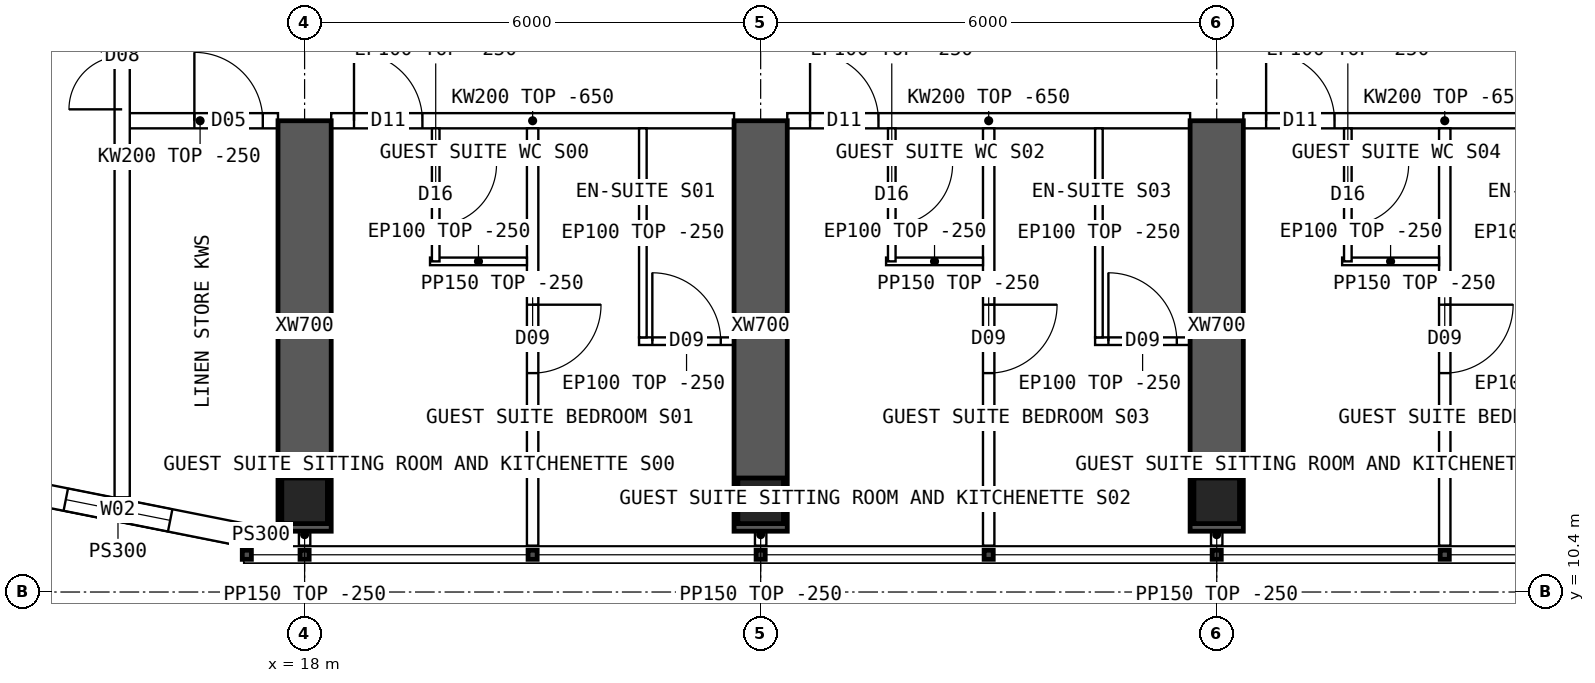
"""IFC4 building model, lengths in metres.
Left out: names, types, materials, properties, quantities, classifications, styles, units other than length and angle.
Written with IfcOpenShell. Run it as: python <this file> out.ifc"""

import sys

from ifc_helpers import new_model, si_unit, direction, frame, frame_2d, origin, origin_2d, place, context, subcontext, project, spatial, polyline, rectangle, hollow_rectangle, outline, extrude, element, fill, save


model = new_model("IFC4")
c1 = context("Model", 3, precision=1e-05, world=origin(), true_north=direction((0.0, 1.0)))
c2 = subcontext(c1, "Body", "Model", "MODEL_VIEW")
j1 = project(units=[si_unit("LENGTHUNIT", "METRE"), si_unit("PLANEANGLEUNIT", "RADIAN")], contexts=[c1])
p1 = place(None, origin())
s1 = spatial("IfcSite", under=j1, at=p1, CompositionType="ELEMENT")
p2 = place(p1, origin())
s2 = spatial("IfcBuilding", under=s1, at=p2, CompositionType="ELEMENT")
p3 = place(p2, frame((0.0, 0.0, 235.3)))
s3 = spatial("IfcBuildingStorey", under=s2, at=p3, CompositionType="ELEMENT", Elevation=235.3)
for number, where, z_axis, x_axis in (
    (1, (18.0, 11.6, 0.0), (0.0, 0.0, 1.0), (1.0, 0.0, 0.0)),
    (2, (24.0, 11.6, 0.0), (0.0, 0.0, 1.0), (1.0, 0.0, 0.0)),
    (3, (30.0, 11.6, 0.0), (0.0, 0.0, 1.0), (1.0, 0.0, 0.0)),
):
    element("IfcColumn", number, at=place(p3, frame(where, z_axis=z_axis, x_axis=x_axis)), inside=s3, PredefinedType="COLUMN", context=c2, shape_type="SweptSolid", body=[
        extrude(hollow_rectangle(XDim=0.6, YDim=0.6, WallThickness=0.06, at=origin_2d()), origin(), (0.0, 0.0, 1.0), 3.75),
    ])
for number, where, z_axis, x_axis in (
    (4, (18.0, 11.2, 0.0), (0.0, 0.0, 1.0), (0.0, 1.0, 0.0)),
    (5, (24.0, 11.2, 0.0), (0.0, 0.0, 1.0), (0.0, 1.0, 0.0)),
    (6, (30.0, 11.2, 0.0), (0.0, 0.0, 1.0), (0.0, 1.0, 0.0)),
):
    element("IfcWall", number, at=place(p3, frame(where, z_axis=z_axis, x_axis=x_axis)), inside=s3, PredefinedType="SHEAR", context=c2, shape_type="SweptSolid", body=[
        extrude(rectangle(XDim=5.4, YDim=0.7, at=frame_2d((2.7, 0.0))), origin(), (0.0, 0.0, 1.0), 3.75),
    ])
p4 = place(p3, frame((13.89, 11.808, 0.0), z_axis=(0.0, 0.0, 1.0), x_axis=(0.98078325777, -0.195100490205, 0.0)))
e7 = element("IfcWall", 7, at=p4, inside=s3, PredefinedType="SOLIDWALL", context=c2, shape_type="SweptSolid", body=[
    extrude(outline(polyline([(-0.03, -0.15), (3.405, -0.15), (3.345, 0.15), (0.03, 0.15), (-0.03, -0.15)])), origin(), (0.0, 0.0, 1.0), 3.5),
])
p5 = place(p4, frame((0.988, 0.0, 0.9)))
e8 = element("IfcOpeningElement", 8, at=p5, cuts=e7, PredefinedType="OPENING", context=c2, shape_type="SweptSolid", body=[
    extrude(rectangle(XDim=1.4, YDim=1.8, at=frame_2d((0.7, 0.9))), frame((0.0, 0.16, 0.0), z_axis=(0.0, -1.0, 0.0), x_axis=(1.0, 0.0, 0.0)), (0.0, 0.0, 1.0), 0.32),
])
p6 = place(p3, frame((17.2, 11.15, 0.0), z_axis=(0.0, 0.0, 1.0), x_axis=(1.0, 0.0, 0.0)))
e9 = element("IfcWall", 9, at=p6, inside=s3, PredefinedType="SOLIDWALL", context=c2, shape_type="SweptSolid", body=[
    extrude(rectangle(XDim=0.45, YDim=0.3, at=frame_2d((0.225, 0.0))), origin(), (0.0, 0.0, 1.0), 3.5),
])
p7 = place(p3, frame((15.6, 16.6, 0.0), z_axis=(0.0, 0.0, 1.0), x_axis=(1.0, 0.0, 0.0)))
e10 = element("IfcWall", 10, at=p7, inside=s3, PredefinedType="SOLIDWALL", context=c2, shape_type="SweptSolid", body=[
    extrude(rectangle(XDim=2.05, YDim=0.2, at=frame_2d((1.025, 0.0))), origin(), (0.0, 0.0, 1.0), 3.5),
])
p8 = place(p7, frame((0.95, 0.0, 0.0)))
e11 = element("IfcOpeningElement", 11, at=p8, cuts=e10, PredefinedType="OPENING", context=c2, shape_type="SweptSolid", body=[
    extrude(rectangle(XDim=0.9, YDim=2.1, at=frame_2d((0.45, 1.05))), frame((0.0, 0.11, 0.0), z_axis=(0.0, -1.0, 0.0), x_axis=(1.0, 0.0, 0.0)), (0.0, 0.0, 1.0), 0.22),
])
p9 = place(p3, frame((18.35, 16.6, 0.0), z_axis=(0.0, 0.0, 1.0), x_axis=(1.0, 0.0, 0.0)))
e12 = element("IfcWall", 12, at=p9, inside=s3, PredefinedType="SOLIDWALL", context=c2, shape_type="SweptSolid", body=[
    extrude(outline(polyline([(0.0, 0.0), (5.3, 0.0), (5.3, 3.1), (0.0, 3.1), (0.0, 0.0)])), frame((0.0, 0.1, 0.0), z_axis=(0.0, -1.0, 0.0), x_axis=(1.0, 0.0, 0.0)), (0.0, 0.0, 1.0), 0.2),
])
p10 = place(p9, frame((0.3, 0.0, 0.0)))
e13 = element("IfcOpeningElement", 13, at=p10, cuts=e12, PredefinedType="OPENING", context=c2, shape_type="SweptSolid", body=[
    extrude(rectangle(XDim=0.9, YDim=2.1, at=frame_2d((0.45, 1.05))), frame((0.0, 0.11, 0.0), z_axis=(0.0, -1.0, 0.0), x_axis=(1.0, 0.0, 0.0)), (0.0, 0.0, 1.0), 0.22),
])
p11 = place(p3, frame((24.35, 16.6, 0.0), z_axis=(0.0, 0.0, 1.0), x_axis=(1.0, 0.0, 0.0)))
e14 = element("IfcWall", 14, at=p11, inside=s3, PredefinedType="SOLIDWALL", context=c2, shape_type="SweptSolid", body=[
    extrude(outline(polyline([(0.0, 0.0), (5.3, 0.0), (5.3, 3.1), (0.0, 3.1), (0.0, 0.0)])), frame((0.0, 0.1, 0.0), z_axis=(0.0, -1.0, 0.0), x_axis=(1.0, 0.0, 0.0)), (0.0, 0.0, 1.0), 0.2),
])
p12 = place(p11, frame((0.3, 0.0, 0.0)))
e15 = element("IfcOpeningElement", 15, at=p12, cuts=e14, PredefinedType="OPENING", context=c2, shape_type="SweptSolid", body=[
    extrude(rectangle(XDim=0.9, YDim=2.1, at=frame_2d((0.45, 1.05))), frame((0.0, 0.11, 0.0), z_axis=(0.0, -1.0, 0.0), x_axis=(1.0, 0.0, 0.0)), (0.0, 0.0, 1.0), 0.22),
])
p13 = place(p3, frame((30.35, 16.6, 0.0), z_axis=(0.0, 0.0, 1.0), x_axis=(1.0, 0.0, 0.0)))
e16 = element("IfcWall", 16, at=p13, inside=s3, PredefinedType="SOLIDWALL", context=c2, shape_type="SweptSolid", body=[
    extrude(outline(polyline([(0.0, 0.0), (5.3, 0.0), (5.3, 3.1), (0.0, 3.1), (0.0, 0.0)])), frame((0.0, 0.1, 0.0), z_axis=(0.0, -1.0, 0.0), x_axis=(1.0, 0.0, 0.0)), (0.0, 0.0, 1.0), 0.2),
])
p14 = place(p13, frame((0.3, 0.0, 0.0)))
e17 = element("IfcOpeningElement", 17, at=p14, cuts=e16, PredefinedType="OPENING", context=c2, shape_type="SweptSolid", body=[
    extrude(rectangle(XDim=0.9, YDim=2.1, at=frame_2d((0.45, 1.05))), frame((0.0, 0.11, 0.0), z_axis=(0.0, -1.0, 0.0), x_axis=(1.0, 0.0, 0.0)), (0.0, 0.0, 1.0), 0.22),
])
p15 = place(p3, frame((21.0, 11.01, 0.0), z_axis=(0.0, 0.0, 1.0), x_axis=(0.0, 1.0, 0.0)))
e18 = element("IfcWall", 18, at=p15, inside=s3, PredefinedType="PARTITIONING", context=c2, shape_type="SweptSolid", body=[
    extrude(outline(polyline([(0.0, 0.0), (5.49, 0.0), (5.49, 3.1), (5.442, 3.1), (5.44, 3.5), (0.792, 3.5), (0.79, 3.1), (0.392, 3.1), (0.39, 3.5), (0.0, 3.5), (0.0, 0.0)])), frame((0.0, 0.075, 0.0), z_axis=(0.0, -1.0, 0.0), x_axis=(1.0, 0.0, 0.0)), (0.0, 0.0, 1.0), 0.15),
])
p16 = place(p15, frame((2.27, 0.0, 0.0)))
e19 = element("IfcOpeningElement", 19, at=p16, cuts=e18, PredefinedType="OPENING", context=c2, shape_type="SweptSolid", body=[
    extrude(rectangle(XDim=0.9, YDim=2.1, at=frame_2d((0.45, 1.05))), frame((0.0, 0.085, 0.0), z_axis=(0.0, -1.0, 0.0), x_axis=(1.0, 0.0, 0.0)), (0.0, 0.0, 1.0), 0.17),
])
p17 = place(p3, frame((23.65, 13.7, 0.0), z_axis=(0.0, 0.0, 1.0), x_axis=(-1.0, 0.0, 0.0)))
e20 = element("IfcWall", 20, at=p17, inside=s3, PredefinedType="PARTITIONING", context=c2, shape_type="SweptSolid", body=[
    extrude(rectangle(XDim=1.25, YDim=0.1, at=frame_2d((0.625, 0.0))), origin(), (0.0, 0.0, 1.0), 3.5),
])
p18 = place(p17, frame((0.175, 0.0, 0.0)))
e21 = element("IfcOpeningElement", 21, at=p18, cuts=e20, PredefinedType="OPENING", context=c2, shape_type="SweptSolid", body=[
    extrude(rectangle(XDim=0.9, YDim=2.1, at=frame_2d((0.45, 1.05))), frame((0.0, 0.06, 0.0), z_axis=(0.0, -1.0, 0.0), x_axis=(1.0, 0.0, 0.0)), (0.0, 0.0, 1.0), 0.12),
])
p19 = place(p3, frame((22.45, 13.75, 0.0), z_axis=(0.0, 0.0, 1.0), x_axis=(0.0, 1.0, 0.0)))
e22 = element("IfcWall", 22, at=p19, inside=s3, PredefinedType="PARTITIONING", context=c2, shape_type="SweptSolid", body=[
    extrude(outline(polyline([(0.0, 0.0), (2.75, 0.0), (2.75, 3.1), (2.702, 3.1), (2.7, 3.5), (0.0, 3.5), (0.0, 0.0)])), frame((0.0, 0.05, 0.0), z_axis=(0.0, -1.0, 0.0), x_axis=(1.0, 0.0, 0.0)), (0.0, 0.0, 1.0), 0.1),
])
p20 = place(p3, frame((19.65, 14.75, 0.0), z_axis=(0.0, 0.0, 1.0), x_axis=(1.0, 0.0, 0.0)))
e23 = element("IfcWall", 23, at=p20, inside=s3, PredefinedType="PARTITIONING", context=c2, shape_type="SweptSolid", body=[
    extrude(rectangle(XDim=1.275, YDim=0.1, at=frame_2d((0.638, 0.0))), origin(), (0.0, 0.0, 1.0), 3.5),
])
p21 = place(p3, frame((19.725, 14.75, 0.0), z_axis=(0.0, 0.0, 1.0), x_axis=(0.0, 1.0, 0.0)))
e24 = element("IfcWall", 24, at=p21, inside=s3, PredefinedType="PARTITIONING", context=c2, shape_type="SweptSolid", body=[
    extrude(outline(polyline([(0.0, 0.0), (1.75, 0.0), (1.75, 3.1), (1.702, 3.1), (1.7, 3.5), (0.0, 3.5), (0.0, 0.0)])), frame((0.0, 0.05, 0.0), z_axis=(0.0, -1.0, 0.0), x_axis=(1.0, 0.0, 0.0)), (0.0, 0.0, 1.0), 0.1),
])
p22 = place(p21, frame((0.475, 0.0, 0.0)))
e25 = element("IfcOpeningElement", 25, at=p22, cuts=e24, PredefinedType="OPENING", context=c2, shape_type="SweptSolid", body=[
    extrude(rectangle(XDim=0.8, YDim=2.1, at=frame_2d((0.4, 1.05))), frame((0.0, 0.06, 0.0), z_axis=(0.0, -1.0, 0.0), x_axis=(1.0, 0.0, 0.0)), (0.0, 0.0, 1.0), 0.12),
])
p23 = place(p3, frame((27.0, 11.01, 0.0), z_axis=(0.0, 0.0, 1.0), x_axis=(0.0, 1.0, 0.0)))
e26 = element("IfcWall", 26, at=p23, inside=s3, PredefinedType="PARTITIONING", context=c2, shape_type="SweptSolid", body=[
    extrude(outline(polyline([(0.0, 0.0), (5.49, 0.0), (5.49, 3.1), (5.442, 3.1), (5.44, 3.5), (0.792, 3.5), (0.79, 3.1), (0.392, 3.1), (0.39, 3.5), (0.0, 3.5), (0.0, 0.0)])), frame((0.0, 0.075, 0.0), z_axis=(0.0, -1.0, 0.0), x_axis=(1.0, 0.0, 0.0)), (0.0, 0.0, 1.0), 0.15),
])
p24 = place(p23, frame((2.27, 0.0, 0.0)))
e27 = element("IfcOpeningElement", 27, at=p24, cuts=e26, PredefinedType="OPENING", context=c2, shape_type="SweptSolid", body=[
    extrude(rectangle(XDim=0.9, YDim=2.1, at=frame_2d((0.45, 1.05))), frame((0.0, 0.085, 0.0), z_axis=(0.0, -1.0, 0.0), x_axis=(1.0, 0.0, 0.0)), (0.0, 0.0, 1.0), 0.17),
])
p25 = place(p3, frame((29.65, 13.7, 0.0), z_axis=(0.0, 0.0, 1.0), x_axis=(-1.0, 0.0, 0.0)))
e28 = element("IfcWall", 28, at=p25, inside=s3, PredefinedType="PARTITIONING", context=c2, shape_type="SweptSolid", body=[
    extrude(rectangle(XDim=1.25, YDim=0.1, at=frame_2d((0.625, 0.0))), origin(), (0.0, 0.0, 1.0), 3.5),
])
p26 = place(p25, frame((0.175, 0.0, 0.0)))
e29 = element("IfcOpeningElement", 29, at=p26, cuts=e28, PredefinedType="OPENING", context=c2, shape_type="SweptSolid", body=[
    extrude(rectangle(XDim=0.9, YDim=2.1, at=frame_2d((0.45, 1.05))), frame((0.0, 0.06, 0.0), z_axis=(0.0, -1.0, 0.0), x_axis=(1.0, 0.0, 0.0)), (0.0, 0.0, 1.0), 0.12),
])
p27 = place(p3, frame((28.45, 13.75, 0.0), z_axis=(0.0, 0.0, 1.0), x_axis=(0.0, 1.0, 0.0)))
e30 = element("IfcWall", 30, at=p27, inside=s3, PredefinedType="PARTITIONING", context=c2, shape_type="SweptSolid", body=[
    extrude(outline(polyline([(0.0, 0.0), (2.75, 0.0), (2.75, 3.1), (2.702, 3.1), (2.7, 3.5), (0.0, 3.5), (0.0, 0.0)])), frame((0.0, 0.05, 0.0), z_axis=(0.0, -1.0, 0.0), x_axis=(1.0, 0.0, 0.0)), (0.0, 0.0, 1.0), 0.1),
])
p28 = place(p3, frame((25.65, 14.75, 0.0), z_axis=(0.0, 0.0, 1.0), x_axis=(1.0, 0.0, 0.0)))
e31 = element("IfcWall", 31, at=p28, inside=s3, PredefinedType="PARTITIONING", context=c2, shape_type="SweptSolid", body=[
    extrude(rectangle(XDim=1.275, YDim=0.1, at=frame_2d((0.638, 0.0))), origin(), (0.0, 0.0, 1.0), 3.5),
])
p29 = place(p3, frame((25.725, 14.75, 0.0), z_axis=(0.0, 0.0, 1.0), x_axis=(0.0, 1.0, 0.0)))
e32 = element("IfcWall", 32, at=p29, inside=s3, PredefinedType="PARTITIONING", context=c2, shape_type="SweptSolid", body=[
    extrude(outline(polyline([(0.0, 0.0), (1.75, 0.0), (1.75, 3.1), (1.702, 3.1), (1.7, 3.5), (0.0, 3.5), (0.0, 0.0)])), frame((0.0, 0.05, 0.0), z_axis=(0.0, -1.0, 0.0), x_axis=(1.0, 0.0, 0.0)), (0.0, 0.0, 1.0), 0.1),
])
p30 = place(p29, frame((0.475, 0.0, 0.0)))
e33 = element("IfcOpeningElement", 33, at=p30, cuts=e32, PredefinedType="OPENING", context=c2, shape_type="SweptSolid", body=[
    extrude(rectangle(XDim=0.8, YDim=2.1, at=frame_2d((0.4, 1.05))), frame((0.0, 0.06, 0.0), z_axis=(0.0, -1.0, 0.0), x_axis=(1.0, 0.0, 0.0)), (0.0, 0.0, 1.0), 0.12),
])
p31 = place(p3, frame((33.0, 11.01, 0.0), z_axis=(0.0, 0.0, 1.0), x_axis=(0.0, 1.0, 0.0)))
e34 = element("IfcWall", 34, at=p31, inside=s3, PredefinedType="PARTITIONING", context=c2, shape_type="SweptSolid", body=[
    extrude(outline(polyline([(0.0, 0.0), (5.49, 0.0), (5.49, 3.1), (5.442, 3.1), (5.44, 3.5), (0.792, 3.5), (0.79, 3.1), (0.392, 3.1), (0.39, 3.5), (0.0, 3.5), (0.0, 0.0)])), frame((0.0, 0.075, 0.0), z_axis=(0.0, -1.0, 0.0), x_axis=(1.0, 0.0, 0.0)), (0.0, 0.0, 1.0), 0.15),
])
p32 = place(p31, frame((2.27, 0.0, 0.0)))
e35 = element("IfcOpeningElement", 35, at=p32, cuts=e34, PredefinedType="OPENING", context=c2, shape_type="SweptSolid", body=[
    extrude(rectangle(XDim=0.9, YDim=2.1, at=frame_2d((0.45, 1.05))), frame((0.0, 0.085, 0.0), z_axis=(0.0, -1.0, 0.0), x_axis=(1.0, 0.0, 0.0)), (0.0, 0.0, 1.0), 0.17),
])
p33 = place(p3, frame((31.65, 14.75, 0.0), z_axis=(0.0, 0.0, 1.0), x_axis=(1.0, 0.0, 0.0)))
e36 = element("IfcWall", 36, at=p33, inside=s3, PredefinedType="PARTITIONING", context=c2, shape_type="SweptSolid", body=[
    extrude(rectangle(XDim=1.275, YDim=0.1, at=frame_2d((0.638, 0.0))), origin(), (0.0, 0.0, 1.0), 3.5),
])
p34 = place(p3, frame((31.725, 14.75, 0.0), z_axis=(0.0, 0.0, 1.0), x_axis=(0.0, 1.0, 0.0)))
e37 = element("IfcWall", 37, at=p34, inside=s3, PredefinedType="PARTITIONING", context=c2, shape_type="SweptSolid", body=[
    extrude(outline(polyline([(0.0, 0.0), (1.75, 0.0), (1.75, 3.1), (1.702, 3.1), (1.7, 3.5), (0.0, 3.5), (0.0, 0.0)])), frame((0.0, 0.05, 0.0), z_axis=(0.0, -1.0, 0.0), x_axis=(1.0, 0.0, 0.0)), (0.0, 0.0, 1.0), 0.1),
])
p35 = place(p34, frame((0.475, 0.0, 0.0)))
e38 = element("IfcOpeningElement", 38, at=p35, cuts=e37, PredefinedType="OPENING", context=c2, shape_type="SweptSolid", body=[
    extrude(rectangle(XDim=0.8, YDim=2.1, at=frame_2d((0.4, 1.05))), frame((0.0, 0.06, 0.0), z_axis=(0.0, -1.0, 0.0), x_axis=(1.0, 0.0, 0.0)), (0.0, 0.0, 1.0), 0.12),
])
p36 = place(p3, frame((15.6, 11.646, 0.0), z_axis=(0.0, 0.0, 1.0), x_axis=(0.0, 1.0, 0.0)))
e39 = element("IfcWall", 39, at=p36, inside=s3, PredefinedType="SOLIDWALL", context=c2, shape_type="SweptSolid", body=[
    extrude(rectangle(XDim=40.708, YDim=0.2, at=frame_2d((20.354, 0.0))), origin(), (0.0, 0.0, 1.0), 3.5),
])
p37 = place(p36, frame((5.104, 0.0, 0.0)))
e40 = element("IfcOpeningElement", 40, at=p37, cuts=e39, PredefinedType="OPENING", context=c2, shape_type="SweptSolid", body=[
    extrude(rectangle(XDim=1.4, YDim=2.1, at=frame_2d((0.7, 1.05))), frame((0.0, 0.11, 0.0), z_axis=(0.0, -1.0, 0.0), x_axis=(1.0, 0.0, 0.0)), (0.0, 0.0, 1.0), 0.22),
])
p38 = place(p36, frame((34.104, 0.0, 0.0)))
e41 = element("IfcOpeningElement", 41, at=p38, cuts=e39, PredefinedType="OPENING", context=c2, shape_type="SweptSolid", body=[
    extrude(rectangle(XDim=1.4, YDim=2.1, at=frame_2d((0.7, 1.05))), frame((0.0, 0.11, 0.0), z_axis=(0.0, -1.0, 0.0), x_axis=(1.0, 0.0, 0.0)), (0.0, 0.0, 1.0), 0.22),
])
for number, where, z_axis, x_axis in (
    (42, (18.0, 11.3, 0.0), (0.0, 0.0, 1.0), (0.0, -1.0, 0.0)),
    (43, (24.0, 11.3, 0.0), (0.0, 0.0, 1.0), (0.0, -1.0, 0.0)),
    (44, (30.0, 11.3, 0.0), (0.0, 0.0, 1.0), (0.0, -1.0, 0.0)),
):
    element("IfcWall", number, at=place(p3, frame(where, z_axis=z_axis, x_axis=x_axis)), inside=s3, PredefinedType="PARTITIONING", context=c2, shape_type="SweptSolid", body=[
        extrude(rectangle(XDim=0.29, YDim=0.15, at=frame_2d((0.145, 0.0))), origin(), (0.0, 0.0, 1.0), 3.5),
    ])
p39 = place(p5, origin())
e45 = element("IfcWindow", 45, at=p39, inside=s3, PartitioningType="SINGLE_PANEL", PredefinedType="WINDOW", context=c2, shape_type="SweptSolid", body=[
    extrude(rectangle(XDim=1.4, YDim=1.8, at=frame_2d((0.7, 0.9))), frame((0.0, 0.03, 0.0), z_axis=(0.0, -1.0, 0.0), x_axis=(1.0, 0.0, 0.0)), (0.0, 0.0, 1.0), 0.06),
])
fill(e8, e45)
p40 = place(p10, origin())
e46 = element("IfcDoor", 46, at=p40, inside=s3, OperationType="SINGLE_SWING_LEFT", PredefinedType="DOOR", context=c2, shape_type="SweptSolid", body=[
    extrude(rectangle(XDim=0.9, YDim=2.1, at=frame_2d((0.45, 1.05))), frame((0.0, 0.025, 0.0), z_axis=(0.0, -1.0, 0.0), x_axis=(1.0, 0.0, 0.0)), (0.0, 0.0, 1.0), 0.05),
])
fill(e13, e46)
p41 = place(p18, origin())
e47 = element("IfcDoor", 47, at=p41, inside=s3, OperationType="SINGLE_SWING_RIGHT", PredefinedType="DOOR", context=c2, shape_type="SweptSolid", body=[
    extrude(rectangle(XDim=0.9, YDim=2.1, at=frame_2d((0.45, 1.05))), frame((0.0, 0.025, 0.0), z_axis=(0.0, -1.0, 0.0), x_axis=(1.0, 0.0, 0.0)), (0.0, 0.0, 1.0), 0.05),
])
fill(e21, e47)
p42 = place(p16, origin())
e48 = element("IfcDoor", 48, at=p42, inside=s3, OperationType="SINGLE_SWING_RIGHT", PredefinedType="DOOR", context=c2, shape_type="SweptSolid", body=[
    extrude(rectangle(XDim=0.9, YDim=2.1, at=frame_2d((0.45, 1.05))), frame((0.0, 0.025, 0.0), z_axis=(0.0, -1.0, 0.0), x_axis=(1.0, 0.0, 0.0)), (0.0, 0.0, 1.0), 0.05),
])
fill(e19, e48)
p43 = place(p22, origin())
e49 = element("IfcDoor", 49, at=p43, inside=s3, OperationType="SINGLE_SWING_RIGHT", PredefinedType="DOOR", context=c2, shape_type="SweptSolid", body=[
    extrude(rectangle(XDim=0.8, YDim=2.1, at=frame_2d((0.4, 1.05))), frame((0.0, 0.025, 0.0), z_axis=(0.0, -1.0, 0.0), x_axis=(1.0, 0.0, 0.0)), (0.0, 0.0, 1.0), 0.05),
])
fill(e25, e49)
p44 = place(p12, origin())
e50 = element("IfcDoor", 50, at=p44, inside=s3, OperationType="SINGLE_SWING_LEFT", PredefinedType="DOOR", context=c2, shape_type="SweptSolid", body=[
    extrude(rectangle(XDim=0.9, YDim=2.1, at=frame_2d((0.45, 1.05))), frame((0.0, 0.025, 0.0), z_axis=(0.0, -1.0, 0.0), x_axis=(1.0, 0.0, 0.0)), (0.0, 0.0, 1.0), 0.05),
])
fill(e15, e50)
p45 = place(p26, origin())
e51 = element("IfcDoor", 51, at=p45, inside=s3, OperationType="SINGLE_SWING_RIGHT", PredefinedType="DOOR", context=c2, shape_type="SweptSolid", body=[
    extrude(rectangle(XDim=0.9, YDim=2.1, at=frame_2d((0.45, 1.05))), frame((0.0, 0.025, 0.0), z_axis=(0.0, -1.0, 0.0), x_axis=(1.0, 0.0, 0.0)), (0.0, 0.0, 1.0), 0.05),
])
fill(e29, e51)
p46 = place(p24, origin())
e52 = element("IfcDoor", 52, at=p46, inside=s3, OperationType="SINGLE_SWING_RIGHT", PredefinedType="DOOR", context=c2, shape_type="SweptSolid", body=[
    extrude(rectangle(XDim=0.9, YDim=2.1, at=frame_2d((0.45, 1.05))), frame((0.0, 0.025, 0.0), z_axis=(0.0, -1.0, 0.0), x_axis=(1.0, 0.0, 0.0)), (0.0, 0.0, 1.0), 0.05),
])
fill(e27, e52)
p47 = place(p30, origin())
e53 = element("IfcDoor", 53, at=p47, inside=s3, OperationType="SINGLE_SWING_RIGHT", PredefinedType="DOOR", context=c2, shape_type="SweptSolid", body=[
    extrude(rectangle(XDim=0.8, YDim=2.1, at=frame_2d((0.4, 1.05))), frame((0.0, 0.025, 0.0), z_axis=(0.0, -1.0, 0.0), x_axis=(1.0, 0.0, 0.0)), (0.0, 0.0, 1.0), 0.05),
])
fill(e33, e53)
p48 = place(p14, origin())
e54 = element("IfcDoor", 54, at=p48, inside=s3, OperationType="SINGLE_SWING_LEFT", PredefinedType="DOOR", context=c2, shape_type="SweptSolid", body=[
    extrude(rectangle(XDim=0.9, YDim=2.1, at=frame_2d((0.45, 1.05))), frame((0.0, 0.025, 0.0), z_axis=(0.0, -1.0, 0.0), x_axis=(1.0, 0.0, 0.0)), (0.0, 0.0, 1.0), 0.05),
])
fill(e17, e54)
p49 = place(p32, origin())
e55 = element("IfcDoor", 55, at=p49, inside=s3, OperationType="SINGLE_SWING_RIGHT", PredefinedType="DOOR", context=c2, shape_type="SweptSolid", body=[
    extrude(rectangle(XDim=0.9, YDim=2.1, at=frame_2d((0.45, 1.05))), frame((0.0, 0.025, 0.0), z_axis=(0.0, -1.0, 0.0), x_axis=(1.0, 0.0, 0.0)), (0.0, 0.0, 1.0), 0.05),
])
fill(e35, e55)
p50 = place(p35, origin())
e56 = element("IfcDoor", 56, at=p50, inside=s3, OperationType="SINGLE_SWING_RIGHT", PredefinedType="DOOR", context=c2, shape_type="SweptSolid", body=[
    extrude(rectangle(XDim=0.8, YDim=2.1, at=frame_2d((0.4, 1.05))), frame((0.0, 0.025, 0.0), z_axis=(0.0, -1.0, 0.0), x_axis=(1.0, 0.0, 0.0)), (0.0, 0.0, 1.0), 0.05),
])
fill(e38, e56)
p51 = place(p37, origin())
e57 = element("IfcDoor", 57, at=p51, inside=s3, OperationType="DOUBLE_DOOR_SINGLE_SWING", PredefinedType="DOOR", context=c2, shape_type="SweptSolid", body=[
    extrude(rectangle(XDim=1.4, YDim=2.1, at=frame_2d((0.7, 1.05))), frame((0.0, 0.025, 0.0), z_axis=(0.0, -1.0, 0.0), x_axis=(1.0, 0.0, 0.0)), (0.0, 0.0, 1.0), 0.05),
])
fill(e40, e57)
p52 = place(p8, origin())
e58 = element("IfcDoor", 58, at=p52, inside=s3, OperationType="SINGLE_SWING_LEFT", PredefinedType="DOOR", context=c2, shape_type="SweptSolid", body=[
    extrude(rectangle(XDim=0.9, YDim=2.1, at=frame_2d((0.45, 1.05))), frame((0.0, 0.025, 0.0), z_axis=(0.0, -1.0, 0.0), x_axis=(1.0, 0.0, 0.0)), (0.0, 0.0, 1.0), 0.05),
])
fill(e11, e58)
save(model, sys.argv[1])
